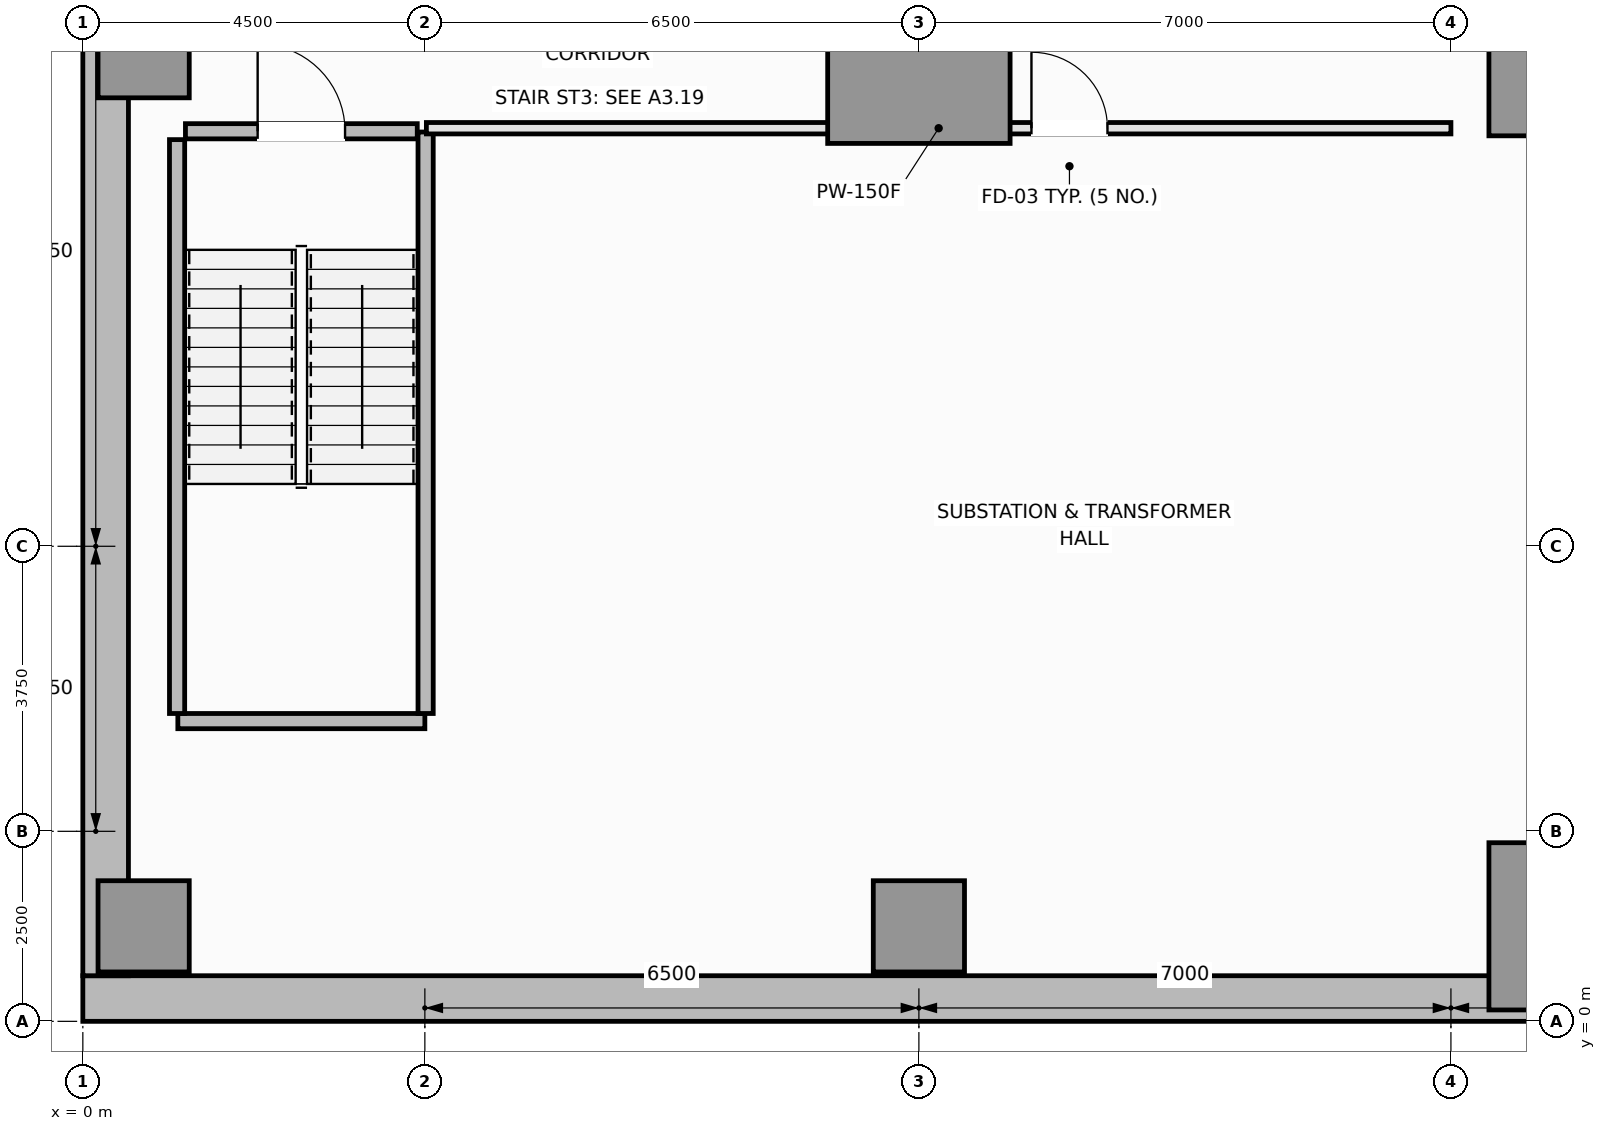
"""IFC4 building model, lengths in metres.
Left out: names, types, materials, properties, quantities, classifications, styles, units other than length and angle.
Written with IfcOpenShell. Run it as: python <this file> out.ifc"""

import sys

from ifc_helpers import new_model, si_unit, direction, frame, frame_2d, origin, origin_2d, place, context, subcontext, project, spatial, rectangle, extrude, element, fill, save


model = new_model("IFC4")
c1 = context("Model", 3, precision=1e-05, world=origin(), true_north=direction((0.0, 1.0)))
c2 = subcontext(c1, "Body", "Model", "MODEL_VIEW")
j1 = project(units=[si_unit("LENGTHUNIT", "METRE"), si_unit("PLANEANGLEUNIT", "RADIAN")], contexts=[c1])
p1 = place(None, origin())
s1 = spatial("IfcSite", under=j1, at=p1, CompositionType="ELEMENT")
p2 = place(p1, origin())
s2 = spatial("IfcBuilding", under=s1, at=p2, CompositionType="ELEMENT")
p3 = place(p2, frame((0.0, 0.0, -9.0)))
s3 = spatial("IfcBuildingStorey", under=s2, at=p3, CompositionType="ELEMENT", Elevation=-9.0)
p4 = place(p3, frame((0.0, 0.3, 0.0), z_axis=(0.0, 0.0, 1.0), x_axis=(1.0, 0.0, 0.0)))
e1 = element("IfcWall", 1, at=p4, inside=s3, PredefinedType="USERDEFINED", context=c2, shape_type="SweptSolid", body=[
    extrude(rectangle(XDim=58.0, YDim=0.6, at=frame_2d((29.0, 0.0))), origin(), (0.0, 0.0, 1.0), 4.2),
])
p5 = place(p3, frame((0.3, 0.6, 0.0), z_axis=(0.0, 0.0, 1.0), x_axis=(0.0, 1.0, 0.0)))
e2 = element("IfcWall", 2, at=p5, inside=s3, PredefinedType="USERDEFINED", context=c2, shape_type="SweptSolid", body=[
    extrude(rectangle(XDim=49.3, YDim=0.6, at=frame_2d((24.65, 0.0))), origin(), (0.0, 0.0, 1.0), 4.2),
])
p6 = place(p3, frame((11.0, 12.75, 0.0), z_axis=(0.0, 0.0, 1.0), x_axis=(1.0, 0.0, 0.0)))
e3 = element("IfcColumn", 3, at=p6, inside=s3, PredefinedType="COLUMN", context=c2, shape_type="SweptSolid", body=[
    extrude(rectangle(XDim=2.4, YDim=2.4, at=origin_2d()), origin(), (0.0, 0.0, 1.0), 4.2),
])
for number, where, z_axis, x_axis in (
    (4, (19.8, 1.25, 0.0), (0.0, 0.0, 1.0), (1.0, 0.0, 0.0)),
    (5, (19.8, 12.75, 0.0), (0.0, 0.0, 1.0), (1.0, 0.0, 0.0)),
):
    element("IfcColumn", number, at=place(p3, frame(where, z_axis=z_axis, x_axis=x_axis)), inside=s3, PredefinedType="COLUMN", context=c2, shape_type="SweptSolid", body=[
        extrude(rectangle(XDim=2.6, YDim=2.2, at=origin_2d()), origin(), (0.0, 0.0, 1.0), 4.2),
    ])
for number, where, z_axis, x_axis in (
    (6, (0.8, 1.25, 0.0), (0.0, 0.0, 1.0), (1.0, 0.0, 0.0)),
    (7, (0.8, 12.75, 0.0), (0.0, 0.0, 1.0), (1.0, 0.0, 0.0)),
    (8, (11.0, 1.25, 0.0), (0.0, 0.0, 1.0), (1.0, 0.0, 0.0)),
):
    element("IfcColumn", number, at=place(p3, frame(where, z_axis=z_axis, x_axis=x_axis)), inside=s3, PredefinedType="COLUMN", context=c2, shape_type="SweptSolid", body=[
        extrude(rectangle(XDim=1.2, YDim=1.2, at=origin_2d()), origin(), (0.0, 0.0, 1.0), 4.2),
    ])
p7 = place(p3, frame((1.25, 3.95, 0.0), z_axis=(0.0, 0.0, 1.0), x_axis=(1.0, 0.0, 0.0)))
e9 = element("IfcWall", 9, at=p7, inside=s3, PredefinedType="SOLIDWALL", context=c2, shape_type="SweptSolid", body=[
    extrude(rectangle(XDim=3.25, YDim=0.2, at=frame_2d((1.625, 0.0))), origin(), (0.0, 0.0, 1.0), 4.2),
])
p8 = place(p3, frame((1.24, 4.05, 0.0), z_axis=(0.0, 0.0, 1.0), x_axis=(0.0, 1.0, 0.0)))
e10 = element("IfcWall", 10, at=p8, inside=s3, PredefinedType="SOLIDWALL", context=c2, shape_type="SweptSolid", body=[
    extrude(rectangle(XDim=7.55, YDim=0.2, at=frame_2d((3.775, 0.0))), origin(), (0.0, 0.0, 1.0), 4.2),
])
p9 = place(p3, frame((4.51, 4.05, 0.0), z_axis=(0.0, 0.0, 1.0), x_axis=(0.0, 1.0, 0.0)))
e11 = element("IfcWall", 11, at=p9, inside=s3, PredefinedType="SOLIDWALL", context=c2, shape_type="SweptSolid", body=[
    extrude(rectangle(XDim=7.65, YDim=0.2, at=frame_2d((3.825, 0.0))), origin(), (0.0, 0.0, 1.0), 4.2),
])
p10 = place(p3, frame((1.35, 11.71, 0.0), z_axis=(0.0, 0.0, 1.0), x_axis=(1.0, 0.0, 0.0)))
e12 = element("IfcWall", 12, at=p10, inside=s3, PredefinedType="SOLIDWALL", context=c2, shape_type="SweptSolid", body=[
    extrude(rectangle(XDim=3.05, YDim=0.2, at=frame_2d((1.525, 0.0))), origin(), (0.0, 0.0, 1.0), 4.2),
])
p11 = place(p10, frame((0.95, 0.0, 0.0)))
e13 = element("IfcOpeningElement", 13, at=p11, cuts=e12, PredefinedType="OPENING", context=c2, shape_type="SweptSolid", body=[
    extrude(rectangle(XDim=1.15, YDim=2.15, at=frame_2d((0.575, 1.075))), frame((0.0, 0.11, 0.0), z_axis=(0.0, -1.0, 0.0), x_axis=(1.0, 0.0, 0.0)), (0.0, 0.0, 1.0), 0.22),
])
p12 = place(p3, frame((4.52, 11.75, 0.0), z_axis=(0.0, 0.0, 1.0), x_axis=(1.0, 0.0, 0.0)))
e14 = element("IfcWall", 14, at=p12, inside=s3, PredefinedType="PARTITIONING", context=c2, shape_type="SweptSolid", body=[
    extrude(rectangle(XDim=13.48, YDim=0.15, at=frame_2d((6.74, 0.0))), origin(), (0.0, 0.0, 1.0), 4.0),
])
p13 = place(p12, frame((7.961, 0.0, 0.0)))
e15 = element("IfcOpeningElement", 15, at=p13, cuts=e14, PredefinedType="OPENING", context=c2, shape_type="SweptSolid", body=[
    extrude(rectangle(XDim=1.0, YDim=2.15, at=frame_2d((0.5, 1.075))), frame((0.0, 0.085, 0.0), z_axis=(0.0, -1.0, 0.0), x_axis=(1.0, 0.0, 0.0)), (0.0, 0.0, 1.0), 0.17),
])
p14 = place(p11, origin())
e16 = element("IfcDoor", 16, at=p14, inside=s3, OperationType="SINGLE_SWING_LEFT", PredefinedType="DOOR", context=c2, shape_type="SweptSolid", body=[
    extrude(rectangle(XDim=1.15, YDim=2.15, at=frame_2d((0.575, 1.075))), frame((0.0, 0.025, 0.0), z_axis=(0.0, -1.0, 0.0), x_axis=(1.0, 0.0, 0.0)), (0.0, 0.0, 1.0), 0.05),
])
fill(e13, e16)
p15 = place(p13, origin())
e17 = element("IfcDoor", 17, at=p15, inside=s3, OperationType="SINGLE_SWING_LEFT", PredefinedType="DOOR", context=c2, shape_type="SweptSolid", body=[
    extrude(rectangle(XDim=1.0, YDim=2.15, at=frame_2d((0.5, 1.075))), frame((0.0, 0.025, 0.0), z_axis=(0.0, -1.0, 0.0), x_axis=(1.0, 0.0, 0.0)), (0.0, 0.0, 1.0), 0.05),
])
fill(e15, e17)
save(model, sys.argv[1])
